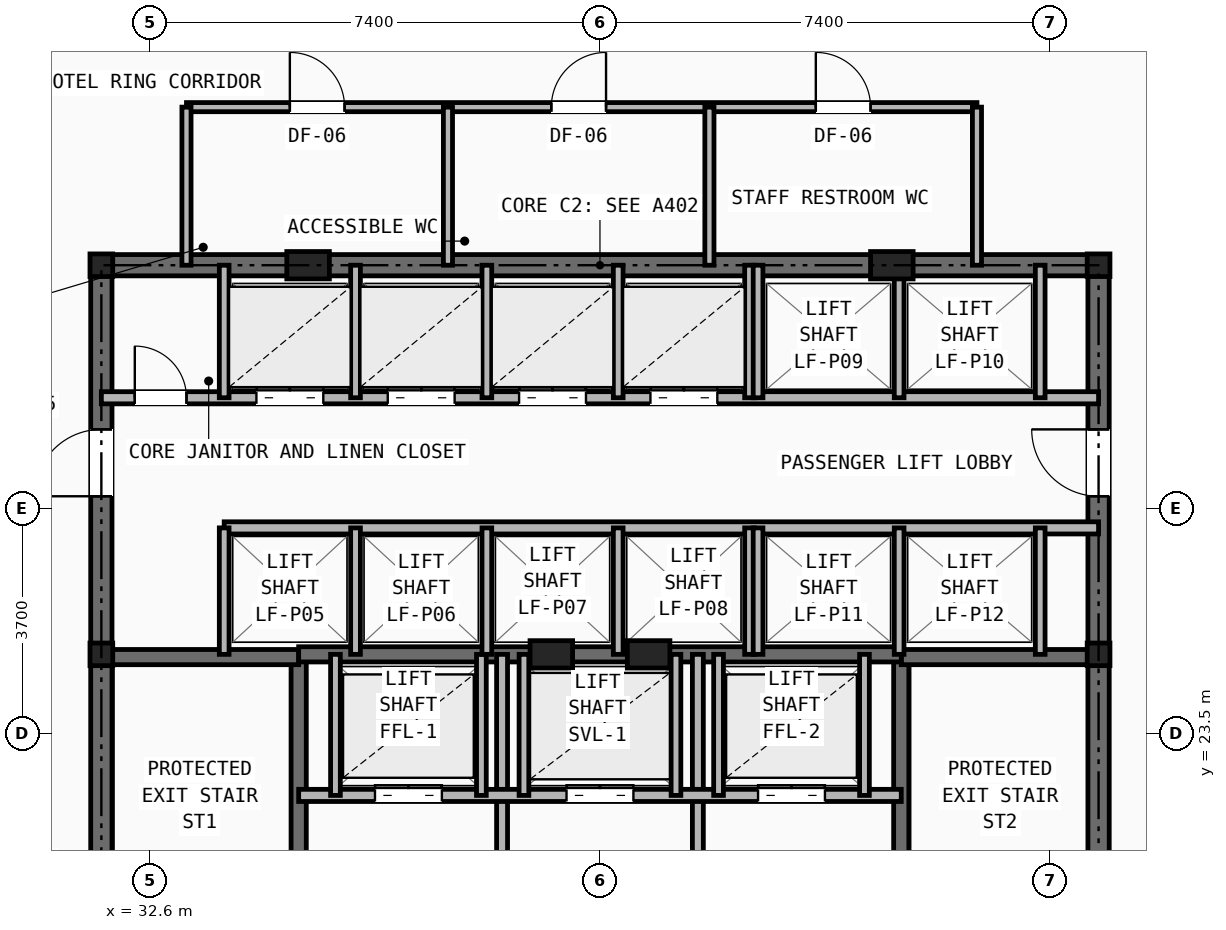
"""IFC4 building model, lengths in metres.
Left out: names, types, materials, properties, quantities, classifications, styles, units other than length and angle.
Written with IfcOpenShell. Run it as: python <this file> out.ifc"""

import sys

from ifc_helpers import new_model, si_unit, direction, frame, frame_2d, origin, origin_2d, place, context, subcontext, project, spatial, rectangle, i_section, extrude, element, fill, save


model = new_model("IFC4")
c1 = context("Model", 3, precision=1e-05, world=origin(), true_north=direction((0.0, 1.0)))
c2 = subcontext(c1, "Body", "Model", "MODEL_VIEW")
j1 = project(units=[si_unit("LENGTHUNIT", "METRE"), si_unit("PLANEANGLEUNIT", "RADIAN")], contexts=[c1])
p1 = place(None, origin())
s1 = spatial("IfcSite", under=j1, at=p1, CompositionType="ELEMENT")
p2 = place(p1, origin())
s2 = spatial("IfcBuilding", under=s1, at=p2, CompositionType="ELEMENT")
p3 = place(p2, frame((0.0, 0.0, 27.2)))
s3 = spatial("IfcBuildingStorey", under=s2, at=p3, CompositionType="ELEMENT", Elevation=27.2)
for number, where, z_axis, x_axis in (
    (1, (31.8, 24.8, 0.0), (0.0, 0.0, 1.0), (1.0, 0.0, 0.0)),
    (2, (48.2, 24.8, 0.0), (0.0, 0.0, 1.0), (1.0, 0.0, 0.0)),
    (3, (31.8, 31.2, 0.0), (0.0, 0.0, 1.0), (1.0, 0.0, 0.0)),
    (4, (48.2, 31.2, 0.0), (0.0, 0.0, 1.0), (1.0, 0.0, 0.0)),
):
    element("IfcColumn", number, at=place(p3, frame(where, z_axis=z_axis, x_axis=x_axis)), inside=s3, PredefinedType="COLUMN", context=c2, shape_type="SweptSolid", body=[
        extrude(i_section(OverallWidth=0.374, OverallDepth=0.372, WebThickness=0.016, FlangeThickness=0.026, at=origin_2d()), origin(), (0.0, 0.0, 1.0), 3.2),
    ])
for number, where, z_axis, x_axis in (
    (5, (35.2, 31.2, 0.0), (0.0, 0.0, 1.0), (1.0, 0.0, 0.0)),
    (6, (44.8, 31.2, 0.0), (0.0, 0.0, 1.0), (1.0, 0.0, 0.0)),
    (7, (39.2, 24.8, 0.0), (0.0, 0.0, 1.0), (1.0, 0.0, 0.0)),
    (8, (40.8, 24.8, 0.0), (0.0, 0.0, 1.0), (1.0, 0.0, 0.0)),
):
    element("IfcColumn", number, at=place(p3, frame(where, z_axis=z_axis, x_axis=x_axis)), inside=s3, PredefinedType="PILASTER", context=c2, shape_type="SweptSolid", body=[
        extrude(rectangle(XDim=0.7, YDim=0.45, at=origin_2d()), origin(), (0.0, 0.0, 1.0), 3.2),
    ])
p4 = place(p3, frame((31.8, 31.2, 0.0), z_axis=(0.0, 0.0, 1.0), x_axis=(1.0, 0.0, 0.0)))
e9 = element("IfcWall", 9, at=p4, inside=s3, PredefinedType="SHEAR", context=c2, shape_type="SweptSolid", body=[
    extrude(rectangle(XDim=16.4, YDim=0.35, at=frame_2d((8.2, 0.0))), origin(), (0.0, 0.0, 1.0), 2.98),
])
p5 = place(p3, frame((31.8, 16.4, 0.0), z_axis=(0.0, 0.0, 1.0), x_axis=(0.0, 1.0, 0.0)))
e10 = element("IfcWall", 10, at=p5, inside=s3, PredefinedType="SHEAR", context=c2, shape_type="SweptSolid", body=[
    extrude(rectangle(XDim=14.8, YDim=0.35, at=frame_2d((7.4, 0.0))), origin(), (0.0, 0.0, 1.0), 2.98),
])
p6 = place(p5, frame((11.0, 0.0, 0.0)))
e11 = element("IfcOpeningElement", 11, at=p6, cuts=e10, PredefinedType="OPENING", context=c2, shape_type="SweptSolid", body=[
    extrude(rectangle(XDim=1.1, YDim=2.15, at=frame_2d((0.55, 1.075))), frame((0.0, 0.185, 0.0), z_axis=(0.0, -1.0, 0.0), x_axis=(1.0, 0.0, 0.0)), (0.0, 0.0, 1.0), 0.37),
])
p7 = place(p3, frame((48.2, 16.4, 0.0), z_axis=(0.0, 0.0, 1.0), x_axis=(0.0, 1.0, 0.0)))
e12 = element("IfcWall", 12, at=p7, inside=s3, PredefinedType="SHEAR", context=c2, shape_type="SweptSolid", body=[
    extrude(rectangle(XDim=14.8, YDim=0.35, at=frame_2d((7.4, 0.0))), origin(), (0.0, 0.0, 1.0), 2.98),
])
p8 = place(p7, frame((11.0, 0.0, 0.0)))
e13 = element("IfcOpeningElement", 13, at=p8, cuts=e12, PredefinedType="OPENING", context=c2, shape_type="SweptSolid", body=[
    extrude(rectangle(XDim=1.1, YDim=2.15, at=frame_2d((0.55, 1.075))), frame((0.0, 0.185, 0.0), z_axis=(0.0, -1.0, 0.0), x_axis=(1.0, 0.0, 0.0)), (0.0, 0.0, 1.0), 0.37),
])
p9 = place(p3, frame((35.045, 16.4, 0.0), z_axis=(0.0, 0.0, 1.0), x_axis=(0.0, 1.0, 0.0)))
e14 = element("IfcWall", 14, at=p9, inside=s3, PredefinedType="SHEAR", context=c2, shape_type="SweptSolid", body=[
    extrude(rectangle(XDim=8.4, YDim=0.25, at=frame_2d((4.2, 0.0))), origin(), (0.0, 0.0, 1.0), 2.98),
])
p10 = place(p9, frame((0.45, 0.0, 0.0)))
e15 = element("IfcOpeningElement", 15, at=p10, cuts=e14, PredefinedType="OPENING", context=c2, shape_type="SweptSolid", body=[
    extrude(rectangle(XDim=0.95, YDim=2.1, at=frame_2d((0.475, 1.05))), frame((0.0, 0.135, 0.0), z_axis=(0.0, -1.0, 0.0), x_axis=(1.0, 0.0, 0.0)), (0.0, 0.0, 1.0), 0.27),
])
p11 = place(p3, frame((31.8, 24.755, 0.0), z_axis=(0.0, 0.0, 1.0), x_axis=(1.0, 0.0, 0.0)))
e16 = element("IfcWall", 16, at=p11, inside=s3, PredefinedType="SHEAR", context=c2, shape_type="SweptSolid", body=[
    extrude(rectangle(XDim=3.245, YDim=0.25, at=frame_2d((1.623, 0.0))), origin(), (0.0, 0.0, 1.0), 2.98),
])
p12 = place(p3, frame((44.955, 16.4, 0.0), z_axis=(0.0, 0.0, 1.0), x_axis=(0.0, 1.0, 0.0)))
e17 = element("IfcWall", 17, at=p12, inside=s3, PredefinedType="SHEAR", context=c2, shape_type="SweptSolid", body=[
    extrude(rectangle(XDim=8.4, YDim=0.25, at=frame_2d((4.2, 0.0))), origin(), (0.0, 0.0, 1.0), 2.98),
])
p13 = place(p12, frame((0.45, 0.0, 0.0)))
e18 = element("IfcOpeningElement", 18, at=p13, cuts=e17, PredefinedType="OPENING", context=c2, shape_type="SweptSolid", body=[
    extrude(rectangle(XDim=0.95, YDim=2.1, at=frame_2d((0.475, 1.05))), frame((0.0, 0.135, 0.0), z_axis=(0.0, -1.0, 0.0), x_axis=(1.0, 0.0, 0.0)), (0.0, 0.0, 1.0), 0.27),
])
p14 = place(p3, frame((44.955, 24.755, 0.0), z_axis=(0.0, 0.0, 1.0), x_axis=(1.0, 0.0, 0.0)))
e19 = element("IfcWall", 19, at=p14, inside=s3, PredefinedType="SHEAR", context=c2, shape_type="SweptSolid", body=[
    extrude(rectangle(XDim=3.245, YDim=0.25, at=frame_2d((1.623, 0.0))), origin(), (0.0, 0.0, 1.0), 2.98),
])
p15 = place(p3, frame((35.045, 24.8, 0.0), z_axis=(0.0, 0.0, 1.0), x_axis=(1.0, 0.0, 0.0)))
e20 = element("IfcWall", 20, at=p15, inside=s3, PredefinedType="SHEAR", context=c2, shape_type="SweptSolid", body=[
    extrude(rectangle(XDim=9.91, YDim=0.25, at=frame_2d((4.955, 0.0))), origin(), (0.0, 0.0, 1.0), 2.98),
])
p16 = place(p3, frame((38.39, 16.4, 0.0), z_axis=(0.0, 0.0, 1.0), x_axis=(0.0, 1.0, 0.0)))
e21 = element("IfcWall", 21, at=p16, inside=s3, PredefinedType="PARTITIONING", context=c2, shape_type="SweptSolid", body=[
    extrude(rectangle(XDim=8.4, YDim=0.18, at=frame_2d((4.2, 0.0))), origin(), (0.0, 0.0, 1.0), 2.431),
])
p17 = place(p16, frame((3.8, 0.0, 0.0)))
e22 = element("IfcOpeningElement", 22, at=p17, cuts=e21, PredefinedType="OPENING", context=c2, shape_type="SweptSolid", body=[
    extrude(rectangle(XDim=0.95, YDim=2.1, at=frame_2d((0.475, 1.05))), frame((0.0, 0.1, 0.0), z_axis=(0.0, -1.0, 0.0), x_axis=(1.0, 0.0, 0.0)), (0.0, 0.0, 1.0), 0.2),
])
p18 = place(p3, frame((41.61, 16.4, 0.0), z_axis=(0.0, 0.0, 1.0), x_axis=(0.0, 1.0, 0.0)))
e23 = element("IfcWall", 23, at=p18, inside=s3, PredefinedType="PARTITIONING", context=c2, shape_type="SweptSolid", body=[
    extrude(rectangle(XDim=8.4, YDim=0.18, at=frame_2d((4.2, 0.0))), origin(), (0.0, 0.0, 1.0), 2.431),
])
p19 = place(p3, frame((35.045, 22.48, 0.0), z_axis=(0.0, 0.0, 1.0), x_axis=(1.0, 0.0, 0.0)))
e24 = element("IfcWall", 24, at=p19, inside=s3, PredefinedType="SOLIDWALL", context=c2, shape_type="SweptSolid", body=[
    extrude(rectangle(XDim=9.91, YDim=0.2, at=frame_2d((4.955, 0.0))), origin(), (0.0, 0.0, 1.0), 2.98),
])
p20 = place(p19, frame((1.255, 0.0, 0.0)))
e25 = element("IfcOpeningElement", 25, at=p20, cuts=e24, PredefinedType="OPENING", context=c2, shape_type="SweptSolid", body=[
    extrude(rectangle(XDim=1.1, YDim=2.15, at=frame_2d((0.55, 1.075))), frame((0.0, 0.11, 0.0), z_axis=(0.0, -1.0, 0.0), x_axis=(1.0, 0.0, 0.0)), (0.0, 0.0, 1.0), 0.22),
])
p21 = place(p19, frame((7.555, 0.0, 0.0)))
e26 = element("IfcOpeningElement", 26, at=p21, cuts=e24, PredefinedType="OPENING", context=c2, shape_type="SweptSolid", body=[
    extrude(rectangle(XDim=1.1, YDim=2.15, at=frame_2d((0.55, 1.075))), frame((0.0, 0.11, 0.0), z_axis=(0.0, -1.0, 0.0), x_axis=(1.0, 0.0, 0.0)), (0.0, 0.0, 1.0), 0.22),
])
p22 = place(p19, frame((4.405, 0.0, 0.0)))
e27 = element("IfcOpeningElement", 27, at=p22, cuts=e24, PredefinedType="OPENING", context=c2, shape_type="SweptSolid", body=[
    extrude(rectangle(XDim=1.1, YDim=2.15, at=frame_2d((0.55, 1.075))), frame((0.0, 0.11, 0.0), z_axis=(0.0, -1.0, 0.0), x_axis=(1.0, 0.0, 0.0)), (0.0, 0.0, 1.0), 0.22),
])
for number, where, z_axis, x_axis in (
    (28, (35.65, 22.48, 0.0), (0.0, 0.0, 1.0), (0.0, 1.0, 0.0)),
    (29, (38.05, 22.48, 0.0), (0.0, 0.0, 1.0), (0.0, 1.0, 0.0)),
    (30, (41.95, 22.48, 0.0), (0.0, 0.0, 1.0), (0.0, 1.0, 0.0)),
    (31, (44.35, 22.48, 0.0), (0.0, 0.0, 1.0), (0.0, 1.0, 0.0)),
    (32, (38.75, 22.48, 0.0), (0.0, 0.0, 1.0), (0.0, 1.0, 0.0)),
    (33, (41.25, 22.48, 0.0), (0.0, 0.0, 1.0), (0.0, 1.0, 0.0)),
):
    element("IfcWall", number, at=place(p3, frame(where, z_axis=z_axis, x_axis=x_axis)), inside=s3, PredefinedType="SOLIDWALL", context=c2, shape_type="SweptSolid", body=[
        extrude(rectangle(XDim=2.32, YDim=0.16, at=frame_2d((1.16, 0.0))), origin(), (0.0, 0.0, 1.0), 2.98),
    ])
p23 = place(p3, frame((31.8, 29.02, 0.0), z_axis=(0.0, 0.0, 1.0), x_axis=(1.0, 0.0, 0.0)))
e34 = element("IfcWall", 34, at=p23, inside=s3, PredefinedType="SOLIDWALL", context=c2, shape_type="SweptSolid", body=[
    extrude(rectangle(XDim=16.4, YDim=0.2, at=frame_2d((8.2, 0.0))), origin(), (0.0, 0.0, 1.0), 2.431),
])
p24 = place(p23, frame((0.55, 0.0, 0.0)))
e35 = element("IfcOpeningElement", 35, at=p24, cuts=e34, PredefinedType="OPENING", context=c2, shape_type="SweptSolid", body=[
    extrude(rectangle(XDim=0.85, YDim=2.05, at=frame_2d((0.425, 1.025))), frame((0.0, 0.11, 0.0), z_axis=(0.0, -1.0, 0.0), x_axis=(1.0, 0.0, 0.0)), (0.0, 0.0, 1.0), 0.22),
])
p25 = place(p23, frame((2.55, 0.0, 0.0)))
e36 = element("IfcOpeningElement", 36, at=p25, cuts=e34, PredefinedType="OPENING", context=c2, shape_type="SweptSolid", body=[
    extrude(rectangle(XDim=1.1, YDim=2.15, at=frame_2d((0.55, 1.075))), frame((0.0, 0.11, 0.0), z_axis=(0.0, -1.0, 0.0), x_axis=(1.0, 0.0, 0.0)), (0.0, 0.0, 1.0), 0.22),
])
p26 = place(p23, frame((4.71, 0.0, 0.0)))
e37 = element("IfcOpeningElement", 37, at=p26, cuts=e34, PredefinedType="OPENING", context=c2, shape_type="SweptSolid", body=[
    extrude(rectangle(XDim=1.1, YDim=2.15, at=frame_2d((0.55, 1.075))), frame((0.0, 0.11, 0.0), z_axis=(0.0, -1.0, 0.0), x_axis=(1.0, 0.0, 0.0)), (0.0, 0.0, 1.0), 0.22),
])
p27 = place(p23, frame((6.87, 0.0, 0.0)))
e38 = element("IfcOpeningElement", 38, at=p27, cuts=e34, PredefinedType="OPENING", context=c2, shape_type="SweptSolid", body=[
    extrude(rectangle(XDim=1.1, YDim=2.15, at=frame_2d((0.55, 1.075))), frame((0.0, 0.11, 0.0), z_axis=(0.0, -1.0, 0.0), x_axis=(1.0, 0.0, 0.0)), (0.0, 0.0, 1.0), 0.22),
])
p28 = place(p23, frame((9.03, 0.0, 0.0)))
e39 = element("IfcOpeningElement", 39, at=p28, cuts=e34, PredefinedType="OPENING", context=c2, shape_type="SweptSolid", body=[
    extrude(rectangle(XDim=1.1, YDim=2.15, at=frame_2d((0.55, 1.075))), frame((0.0, 0.11, 0.0), z_axis=(0.0, -1.0, 0.0), x_axis=(1.0, 0.0, 0.0)), (0.0, 0.0, 1.0), 0.22),
])
p29 = place(p3, frame((33.82, 26.88, 0.0), z_axis=(0.0, 0.0, 1.0), x_axis=(1.0, 0.0, 0.0)))
e40 = element("IfcWall", 40, at=p29, inside=s3, PredefinedType="SOLIDWALL", context=c2, shape_type="SweptSolid", body=[
    extrude(rectangle(XDim=14.38, YDim=0.2, at=frame_2d((7.19, 0.0))), origin(), (0.0, 0.0, 1.0), 2.431),
])
p30 = place(p3, frame((33.82, 29.02, 0.0), z_axis=(0.0, 0.0, 1.0), x_axis=(0.0, 1.0, 0.0)))
e41 = element("IfcWall", 41, at=p30, inside=s3, PredefinedType="SOLIDWALL", context=c2, shape_type="SweptSolid", body=[
    extrude(rectangle(XDim=2.18, YDim=0.16, at=frame_2d((1.09, 0.0))), origin(), (0.0, 0.0, 1.0), 2.431),
])
p31 = place(p3, frame((33.82, 24.8, 0.0), z_axis=(0.0, 0.0, 1.0), x_axis=(0.0, 1.0, 0.0)))
e42 = element("IfcWall", 42, at=p31, inside=s3, PredefinedType="SOLIDWALL", context=c2, shape_type="SweptSolid", body=[
    extrude(rectangle(XDim=2.08, YDim=0.16, at=frame_2d((1.04, 0.0))), origin(), (0.0, 0.0, 1.0), 2.98),
])
for number, where, z_axis, x_axis in (
    (43, (35.98, 29.02, 0.0), (0.0, 0.0, 1.0), (0.0, 1.0, 0.0)),
    (44, (38.14, 29.02, 0.0), (0.0, 0.0, 1.0), (0.0, 1.0, 0.0)),
    (45, (40.3, 29.02, 0.0), (0.0, 0.0, 1.0), (0.0, 1.0, 0.0)),
    (46, (42.46, 29.02, 0.0), (0.0, 0.0, 1.0), (0.0, 1.0, 0.0)),
):
    element("IfcWall", number, at=place(p3, frame(where, z_axis=z_axis, x_axis=x_axis)), inside=s3, PredefinedType="SOLIDWALL", context=c2, shape_type="SweptSolid", body=[
        extrude(rectangle(XDim=2.18, YDim=0.16, at=frame_2d((1.09, 0.0))), origin(), (0.0, 0.0, 1.0), 2.431),
    ])
for number, where, z_axis, x_axis in (
    (47, (35.98, 24.8, 0.0), (0.0, 0.0, 1.0), (0.0, 1.0, 0.0)),
    (48, (38.14, 24.8, 0.0), (0.0, 0.0, 1.0), (0.0, 1.0, 0.0)),
    (49, (40.3, 24.8, 0.0), (0.0, 0.0, 1.0), (0.0, 1.0, 0.0)),
    (50, (42.46, 24.8, 0.0), (0.0, 0.0, 1.0), (0.0, 1.0, 0.0)),
):
    element("IfcWall", number, at=place(p3, frame(where, z_axis=z_axis, x_axis=x_axis)), inside=s3, PredefinedType="SOLIDWALL", context=c2, shape_type="SweptSolid", body=[
        extrude(rectangle(XDim=2.08, YDim=0.16, at=frame_2d((1.04, 0.0))), origin(), (0.0, 0.0, 1.0), 2.98),
    ])
for number, where, z_axis, x_axis in (
    (51, (42.6, 29.02, 0.0), (0.0, 0.0, 1.0), (0.0, 1.0, 0.0)),
    (52, (44.92, 29.02, 0.0), (0.0, 0.0, 1.0), (0.0, 1.0, 0.0)),
    (53, (47.24, 29.02, 0.0), (0.0, 0.0, 1.0), (0.0, 1.0, 0.0)),
):
    element("IfcWall", number, at=place(p3, frame(where, z_axis=z_axis, x_axis=x_axis)), inside=s3, PredefinedType="SOLIDWALL", context=c2, shape_type="SweptSolid", body=[
        extrude(rectangle(XDim=2.18, YDim=0.16, at=frame_2d((1.09, 0.0))), origin(), (0.0, 0.0, 1.0), 2.431),
    ])
for number, where, z_axis, x_axis in (
    (54, (42.6, 24.8, 0.0), (0.0, 0.0, 1.0), (0.0, 1.0, 0.0)),
    (55, (44.92, 24.8, 0.0), (0.0, 0.0, 1.0), (0.0, 1.0, 0.0)),
    (56, (47.24, 24.8, 0.0), (0.0, 0.0, 1.0), (0.0, 1.0, 0.0)),
):
    element("IfcWall", number, at=place(p3, frame(where, z_axis=z_axis, x_axis=x_axis)), inside=s3, PredefinedType="SOLIDWALL", context=c2, shape_type="SweptSolid", body=[
        extrude(rectangle(XDim=2.08, YDim=0.16, at=frame_2d((1.04, 0.0))), origin(), (0.0, 0.0, 1.0), 2.98),
    ])
p32 = place(p3, frame((33.2, 33.8, 0.0), z_axis=(0.0, 0.0, 1.0), x_axis=(1.0, 0.0, 0.0)))
e57 = element("IfcWall", 57, at=p32, inside=s3, PredefinedType="PARTITIONING", context=c2, shape_type="SweptSolid", body=[
    extrude(rectangle(XDim=13.0, YDim=0.15, at=frame_2d((6.5, 0.0))), origin(), (0.0, 0.0, 1.0), 2.98),
])
p33 = place(p32, frame((1.7, 0.0, 0.0)))
e58 = element("IfcOpeningElement", 58, at=p33, cuts=e57, PredefinedType="OPENING", context=c2, shape_type="SweptSolid", body=[
    extrude(rectangle(XDim=0.9, YDim=2.1, at=frame_2d((0.45, 1.05))), frame((0.0, 0.085, 0.0), z_axis=(0.0, -1.0, 0.0), x_axis=(1.0, 0.0, 0.0)), (0.0, 0.0, 1.0), 0.17),
])
p34 = place(p32, frame((6.0, 0.0, 0.0)))
e59 = element("IfcOpeningElement", 59, at=p34, cuts=e57, PredefinedType="OPENING", context=c2, shape_type="SweptSolid", body=[
    extrude(rectangle(XDim=0.9, YDim=2.1, at=frame_2d((0.45, 1.05))), frame((0.0, 0.085, 0.0), z_axis=(0.0, -1.0, 0.0), x_axis=(1.0, 0.0, 0.0)), (0.0, 0.0, 1.0), 0.17),
])
p35 = place(p32, frame((10.35, 0.0, 0.0)))
e60 = element("IfcOpeningElement", 60, at=p35, cuts=e57, PredefinedType="OPENING", context=c2, shape_type="SweptSolid", body=[
    extrude(rectangle(XDim=0.9, YDim=2.1, at=frame_2d((0.45, 1.05))), frame((0.0, 0.085, 0.0), z_axis=(0.0, -1.0, 0.0), x_axis=(1.0, 0.0, 0.0)), (0.0, 0.0, 1.0), 0.17),
])
for number, where, z_axis, x_axis in (
    (61, (33.2, 31.2, 0.0), (0.0, 0.0, 1.0), (0.0, 1.0, 0.0)),
    (62, (46.2, 31.2, 0.0), (0.0, 0.0, 1.0), (0.0, 1.0, 0.0)),
    (63, (37.5, 31.2, 0.0), (0.0, 0.0, 1.0), (0.0, 1.0, 0.0)),
    (64, (41.8, 31.2, 0.0), (0.0, 0.0, 1.0), (0.0, 1.0, 0.0)),
):
    element("IfcWall", number, at=place(p3, frame(where, z_axis=z_axis, x_axis=x_axis)), inside=s3, PredefinedType="PARTITIONING", context=c2, shape_type="SweptSolid", body=[
        extrude(rectangle(XDim=2.6, YDim=0.15, at=frame_2d((1.3, 0.0))), origin(), (0.0, 0.0, 1.0), 2.431),
    ])
p36 = place(p20, origin())
e65 = element("IfcDoor", 65, at=p36, inside=s3, OperationType="DOUBLE_DOOR_SLIDING", PredefinedType="DOOR", context=c2, shape_type="SweptSolid", body=[
    extrude(rectangle(XDim=1.1, YDim=2.15, at=frame_2d((0.55, 1.075))), frame((0.0, 0.025, 0.0), z_axis=(0.0, -1.0, 0.0), x_axis=(1.0, 0.0, 0.0)), (0.0, 0.0, 1.0), 0.05),
])
fill(e25, e65)
p37 = place(p21, origin())
e66 = element("IfcDoor", 66, at=p37, inside=s3, OperationType="DOUBLE_DOOR_SLIDING", PredefinedType="DOOR", context=c2, shape_type="SweptSolid", body=[
    extrude(rectangle(XDim=1.1, YDim=2.15, at=frame_2d((0.55, 1.075))), frame((0.0, 0.025, 0.0), z_axis=(0.0, -1.0, 0.0), x_axis=(1.0, 0.0, 0.0)), (0.0, 0.0, 1.0), 0.05),
])
fill(e26, e66)
p38 = place(p22, origin())
e67 = element("IfcDoor", 67, at=p38, inside=s3, OperationType="DOUBLE_DOOR_SLIDING", PredefinedType="DOOR", context=c2, shape_type="SweptSolid", body=[
    extrude(rectangle(XDim=1.1, YDim=2.15, at=frame_2d((0.55, 1.075))), frame((0.0, 0.025, 0.0), z_axis=(0.0, -1.0, 0.0), x_axis=(1.0, 0.0, 0.0)), (0.0, 0.0, 1.0), 0.05),
])
fill(e27, e67)
p39 = place(p24, origin())
e68 = element("IfcDoor", 68, at=p39, inside=s3, OperationType="SINGLE_SWING_LEFT", PredefinedType="DOOR", context=c2, shape_type="SweptSolid", body=[
    extrude(rectangle(XDim=0.85, YDim=2.05, at=frame_2d((0.425, 1.025))), frame((0.0, 0.025, 0.0), z_axis=(0.0, -1.0, 0.0), x_axis=(1.0, 0.0, 0.0)), (0.0, 0.0, 1.0), 0.05),
])
fill(e35, e68)
p40 = place(p6, origin())
e69 = element("IfcDoor", 69, at=p40, inside=s3, OperationType="SINGLE_SWING_LEFT", PredefinedType="DOOR", context=c2, shape_type="SweptSolid", body=[
    extrude(rectangle(XDim=1.1, YDim=2.15, at=frame_2d((0.55, 1.075))), frame((0.0, 0.025, 0.0), z_axis=(0.0, -1.0, 0.0), x_axis=(1.0, 0.0, 0.0)), (0.0, 0.0, 1.0), 0.05),
])
fill(e11, e69)
p41 = place(p8, origin())
e70 = element("IfcDoor", 70, at=p41, inside=s3, OperationType="SINGLE_SWING_RIGHT", PredefinedType="DOOR", context=c2, shape_type="SweptSolid", body=[
    extrude(rectangle(XDim=1.1, YDim=2.15, at=frame_2d((0.55, 1.075))), frame((0.0, 0.025, 0.0), z_axis=(0.0, -1.0, 0.0), x_axis=(1.0, 0.0, 0.0)), (0.0, 0.0, 1.0), 0.05),
])
fill(e13, e70)
p42 = place(p25, origin())
e71 = element("IfcDoor", 71, at=p42, inside=s3, OperationType="DOUBLE_DOOR_SLIDING", PredefinedType="DOOR", context=c2, shape_type="SweptSolid", body=[
    extrude(rectangle(XDim=1.1, YDim=2.15, at=frame_2d((0.55, 1.075))), frame((0.0, 0.025, 0.0), z_axis=(0.0, -1.0, 0.0), x_axis=(1.0, 0.0, 0.0)), (0.0, 0.0, 1.0), 0.05),
])
fill(e36, e71)
p43 = place(p26, origin())
e72 = element("IfcDoor", 72, at=p43, inside=s3, OperationType="DOUBLE_DOOR_SLIDING", PredefinedType="DOOR", context=c2, shape_type="SweptSolid", body=[
    extrude(rectangle(XDim=1.1, YDim=2.15, at=frame_2d((0.55, 1.075))), frame((0.0, 0.025, 0.0), z_axis=(0.0, -1.0, 0.0), x_axis=(1.0, 0.0, 0.0)), (0.0, 0.0, 1.0), 0.05),
])
fill(e37, e72)
p44 = place(p27, origin())
e73 = element("IfcDoor", 73, at=p44, inside=s3, OperationType="DOUBLE_DOOR_SLIDING", PredefinedType="DOOR", context=c2, shape_type="SweptSolid", body=[
    extrude(rectangle(XDim=1.1, YDim=2.15, at=frame_2d((0.55, 1.075))), frame((0.0, 0.025, 0.0), z_axis=(0.0, -1.0, 0.0), x_axis=(1.0, 0.0, 0.0)), (0.0, 0.0, 1.0), 0.05),
])
fill(e38, e73)
p45 = place(p28, origin())
e74 = element("IfcDoor", 74, at=p45, inside=s3, OperationType="DOUBLE_DOOR_SLIDING", PredefinedType="DOOR", context=c2, shape_type="SweptSolid", body=[
    extrude(rectangle(XDim=1.1, YDim=2.15, at=frame_2d((0.55, 1.075))), frame((0.0, 0.025, 0.0), z_axis=(0.0, -1.0, 0.0), x_axis=(1.0, 0.0, 0.0)), (0.0, 0.0, 1.0), 0.05),
])
fill(e39, e74)
p46 = place(p33, origin())
e75 = element("IfcDoor", 75, at=p46, inside=s3, OperationType="SINGLE_SWING_LEFT", PredefinedType="DOOR", context=c2, shape_type="SweptSolid", body=[
    extrude(rectangle(XDim=0.9, YDim=2.1, at=frame_2d((0.45, 1.05))), frame((0.0, 0.025, 0.0), z_axis=(0.0, -1.0, 0.0), x_axis=(1.0, 0.0, 0.0)), (0.0, 0.0, 1.0), 0.05),
])
fill(e58, e75)
p47 = place(p34, origin())
e76 = element("IfcDoor", 76, at=p47, inside=s3, OperationType="SINGLE_SWING_RIGHT", PredefinedType="DOOR", context=c2, shape_type="SweptSolid", body=[
    extrude(rectangle(XDim=0.9, YDim=2.1, at=frame_2d((0.45, 1.05))), frame((0.0, 0.025, 0.0), z_axis=(0.0, -1.0, 0.0), x_axis=(1.0, 0.0, 0.0)), (0.0, 0.0, 1.0), 0.05),
])
fill(e59, e76)
p48 = place(p35, origin())
e77 = element("IfcDoor", 77, at=p48, inside=s3, OperationType="SINGLE_SWING_LEFT", PredefinedType="DOOR", context=c2, shape_type="SweptSolid", body=[
    extrude(rectangle(XDim=0.9, YDim=2.1, at=frame_2d((0.45, 1.05))), frame((0.0, 0.025, 0.0), z_axis=(0.0, -1.0, 0.0), x_axis=(1.0, 0.0, 0.0)), (0.0, 0.0, 1.0), 0.05),
])
fill(e60, e77)
save(model, sys.argv[1])
